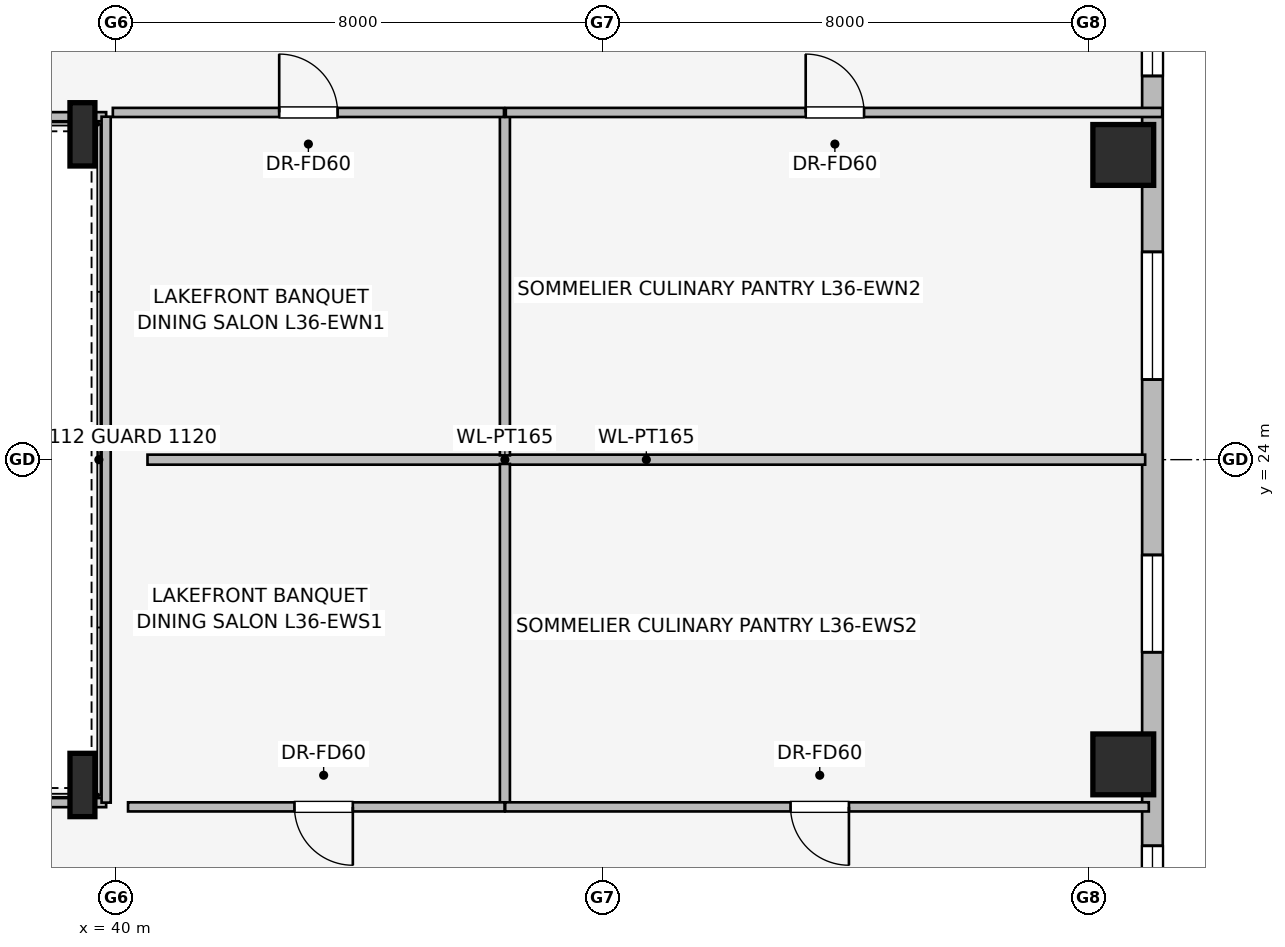
"""IFC4 building model, lengths in metres.
Left out: names, types, materials, properties, quantities, classifications, styles, units other than length and angle.
Written with IfcOpenShell. Run it as: python <this file> out.ifc"""

import sys

from ifc_helpers import new_model, si_unit, direction, frame, frame_2d, origin, origin_2d, place, context, subcontext, project, spatial, rectangle, i_section, extrude, element, fill, save


model = new_model("IFC4")
c1 = context("Model", 3, precision=1e-05, world=origin(), true_north=direction((0.0, 1.0)))
c2 = subcontext(c1, "Body", "Model", "MODEL_VIEW")
j1 = project(units=[si_unit("LENGTHUNIT", "METRE"), si_unit("PLANEANGLEUNIT", "RADIAN")], contexts=[c1])
p1 = place(None, origin())
s1 = spatial("IfcSite", under=j1, at=p1, CompositionType="ELEMENT")
p2 = place(p1, origin())
s2 = spatial("IfcBuilding", under=s1, at=p2, CompositionType="ELEMENT")
p3 = place(p2, frame((0.0, 0.0, 136.05)))
s3 = spatial("IfcBuildingStorey", under=s2, at=p3, CompositionType="ELEMENT", Elevation=136.05)
for number, where, z_axis, x_axis in (
    (1, (56.568, 18.989, 0.0), (0.0, 0.0, 1.0), (1.0, 0.0, 0.0)),
    (2, (56.568, 29.011, 0.0), (0.0, 0.0, 1.0), (1.0, 0.0, 0.0)),
):
    element("IfcColumn", number, at=place(p3, frame(where, z_axis=z_axis, x_axis=x_axis)), inside=s3, PredefinedType="COLUMN", context=c2, shape_type="SweptSolid", body=[
        extrude(rectangle(XDim=1.0, YDim=1.0, at=origin_2d()), origin(), (0.0, 0.0, 1.0), 3.45),
    ])
for number, where, z_axis, x_axis in (
    (3, (39.45, 18.65, 0.0), (0.0, 0.0, 1.0), (1.0, 0.0, 0.0)),
    (4, (39.45, 29.35, 0.0), (0.0, 0.0, 1.0), (1.0, 0.0, 0.0)),
):
    element("IfcColumn", number, at=place(p3, frame(where, z_axis=z_axis, x_axis=x_axis)), inside=s3, PredefinedType="COLUMN", context=c2, shape_type="SweptSolid", body=[
        extrude(i_section(OverallWidth=0.41, OverallDepth=1.041, WebThickness=0.031, FlangeThickness=0.056, at=origin_2d()), origin(), (0.0, 0.0, 1.0), 3.45),
    ])
p4 = place(p3, frame((57.048, 32.352, 0.0), z_axis=(0.0, 0.0, 1.0), x_axis=(0.0, -1.0, 0.0)))
e5 = element("IfcWall", 5, at=p4, inside=s3, PredefinedType="STANDARD", context=c2, shape_type="SweptSolid", body=[
    extrude(rectangle(XDim=16.704, YDim=0.34, at=frame_2d((8.352, 0.0))), origin(), (0.0, 0.0, 1.0), 3.16),
])
p5 = place(p4, frame((0.992, 0.0, 0.75)))
e6 = element("IfcOpeningElement", 6, at=p5, cuts=e5, PredefinedType="OPENING", context=c2, shape_type="SweptSolid", body=[
    extrude(rectangle(XDim=1.05, YDim=1.4, at=frame_2d((0.525, 0.7))), frame((0.0, 0.18, 0.0), z_axis=(0.0, -1.0, 0.0), x_axis=(1.0, 0.0, 0.0)), (0.0, 0.0, 1.0), 0.36),
])
p6 = place(p4, frame((4.935, 0.0, 0.75)))
e7 = element("IfcOpeningElement", 7, at=p6, cuts=e5, PredefinedType="OPENING", context=c2, shape_type="SweptSolid", body=[
    extrude(rectangle(XDim=2.1, YDim=1.5, at=frame_2d((1.05, 0.75))), frame((0.0, 0.18, 0.0), z_axis=(0.0, -1.0, 0.0), x_axis=(1.0, 0.0, 0.0)), (0.0, 0.0, 1.0), 0.36),
])
p7 = place(p4, frame((9.919, 0.0, 0.75)))
e8 = element("IfcOpeningElement", 8, at=p7, cuts=e5, PredefinedType="OPENING", context=c2, shape_type="SweptSolid", body=[
    extrude(rectangle(XDim=1.6, YDim=1.55, at=frame_2d((0.8, 0.775))), frame((0.0, 0.18, 0.0), z_axis=(0.0, -1.0, 0.0), x_axis=(1.0, 0.0, 0.0)), (0.0, 0.0, 1.0), 0.36),
])
p8 = place(p4, frame((14.702, 0.0, 0.75)))
e9 = element("IfcOpeningElement", 9, at=p8, cuts=e5, PredefinedType="OPENING", context=c2, shape_type="SweptSolid", body=[
    extrude(rectangle(XDim=1.05, YDim=1.4, at=frame_2d((0.525, 0.7))), frame((0.0, 0.18, 0.0), z_axis=(0.0, -1.0, 0.0), x_axis=(1.0, 0.0, 0.0)), (0.0, 0.0, 1.0), 0.36),
])
p9 = place(p3, frame((27.675, 18.36, 0.0), z_axis=(0.0, 0.0, 1.0), x_axis=(1.0, 0.0, 0.0)))
e10 = element("IfcWall", 10, at=p9, inside=s3, PredefinedType="PARTITIONING", context=c2, shape_type="SweptSolid", body=[
    extrude(rectangle(XDim=12.165, YDim=0.15, at=frame_2d((6.083, 0.0))), origin(), (0.0, 0.0, 1.0), 2.301),
])
p10 = place(p3, frame((39.84, 29.64, 0.0), z_axis=(0.0, 0.0, 1.0), x_axis=(-1.0, 0.0, 0.0)))
e11 = element("IfcWall", 11, at=p10, inside=s3, PredefinedType="PARTITIONING", context=c2, shape_type="SweptSolid", body=[
    extrude(rectangle(XDim=12.2, YDim=0.15, at=frame_2d((6.1, 0.0))), origin(), (0.0, 0.0, 1.0), 2.301),
])
p11 = place(p3, frame((39.84, 18.36, 0.0), z_axis=(0.0, 0.0, 1.0), x_axis=(0.0, 1.0, 0.0)))
e12 = element("IfcWall", 12, at=p11, inside=s3, PredefinedType="PARTITIONING", context=c2, shape_type="SweptSolid", body=[
    extrude(rectangle(XDim=11.28, YDim=0.15, at=frame_2d((5.64, 0.0))), origin(), (0.0, 0.0, 1.0), 3.16),
])
p12 = place(p3, frame((40.52, 24.0, 0.0), z_axis=(0.0, 0.0, 1.0), x_axis=(1.0, 0.0, 0.0)))
e13 = element("IfcWall", 13, at=p12, inside=s3, PredefinedType="PARTITIONING", context=c2, shape_type="SweptSolid", body=[
    extrude(rectangle(XDim=16.408, YDim=0.165, at=frame_2d((8.204, 0.0))), origin(), (0.0, 0.0, 1.0), 3.16),
])
p13 = place(p3, frame((46.398, 24.07, 0.0), z_axis=(0.0, 0.0, 1.0), x_axis=(0.0, 1.0, 0.0)))
e14 = element("IfcWall", 14, at=p13, inside=s3, PredefinedType="PARTITIONING", context=c2, shape_type="SweptSolid", body=[
    extrude(rectangle(XDim=5.64, YDim=0.165, at=frame_2d((2.82, 0.0))), origin(), (0.0, 0.0, 1.0), 2.703),
])
p14 = place(p3, frame((39.95, 29.71, 0.0), z_axis=(0.0, 0.0, 1.0), x_axis=(1.0, 0.0, 0.0)))
e15 = element("IfcWall", 15, at=p14, inside=s3, PredefinedType="PARTITIONING", context=c2, shape_type="SweptSolid", body=[
    extrude(rectangle(XDim=6.433, YDim=0.15, at=frame_2d((3.217, 0.0))), origin(), (0.0, 0.0, 1.0), 3.16),
])
p15 = place(p14, frame((2.736, 0.0, 0.0)))
e16 = element("IfcOpeningElement", 16, at=p15, cuts=e15, PredefinedType="OPENING", context=c2, shape_type="SweptSolid", body=[
    extrude(rectangle(XDim=0.96, YDim=2.0, at=frame_2d((0.48, 1.0))), frame((0.0, 0.085, 0.0), z_axis=(0.0, -1.0, 0.0), x_axis=(1.0, 0.0, 0.0)), (0.0, 0.0, 1.0), 0.17),
])
p16 = place(p3, frame((46.413, 29.71, 0.0), z_axis=(0.0, 0.0, 1.0), x_axis=(1.0, 0.0, 0.0)))
e17 = element("IfcWall", 17, at=p16, inside=s3, PredefinedType="PARTITIONING", context=c2, shape_type="SweptSolid", body=[
    extrude(rectangle(XDim=10.795, YDim=0.15, at=frame_2d((5.397, 0.0))), origin(), (0.0, 0.0, 1.0), 3.16),
])
p17 = place(p16, frame((4.932, 0.0, 0.0)))
e18 = element("IfcOpeningElement", 18, at=p17, cuts=e17, PredefinedType="OPENING", context=c2, shape_type="SweptSolid", body=[
    extrude(rectangle(XDim=0.96, YDim=2.0, at=frame_2d((0.48, 1.0))), frame((0.0, 0.085, 0.0), z_axis=(0.0, -1.0, 0.0), x_axis=(1.0, 0.0, 0.0)), (0.0, 0.0, 1.0), 0.17),
])
p18 = place(p3, frame((46.398, 18.29, 0.0), z_axis=(0.0, 0.0, 1.0), x_axis=(0.0, 1.0, 0.0)))
e19 = element("IfcWall", 19, at=p18, inside=s3, PredefinedType="PARTITIONING", context=c2, shape_type="SweptSolid", body=[
    extrude(rectangle(XDim=5.64, YDim=0.165, at=frame_2d((2.82, 0.0))), origin(), (0.0, 0.0, 1.0), 2.703),
])
p19 = place(p3, frame((46.393, 18.29, 0.0), z_axis=(0.0, 0.0, 1.0), x_axis=(-1.0, 0.0, 0.0)))
e20 = element("IfcWall", 20, at=p19, inside=s3, PredefinedType="PARTITIONING", context=c2, shape_type="SweptSolid", body=[
    extrude(rectangle(XDim=6.193, YDim=0.15, at=frame_2d((3.097, 0.0))), origin(), (0.0, 0.0, 1.0), 3.16),
])
p20 = place(p19, frame((2.496, 0.0, 0.0)))
e21 = element("IfcOpeningElement", 21, at=p20, cuts=e20, PredefinedType="OPENING", context=c2, shape_type="SweptSolid", body=[
    extrude(rectangle(XDim=0.96, YDim=2.0, at=frame_2d((0.48, 1.0))), frame((0.0, 0.085, 0.0), z_axis=(0.0, -1.0, 0.0), x_axis=(1.0, 0.0, 0.0)), (0.0, 0.0, 1.0), 0.17),
])
p21 = place(p3, frame((56.988, 18.29, 0.0), z_axis=(0.0, 0.0, 1.0), x_axis=(-1.0, 0.0, 0.0)))
e22 = element("IfcWall", 22, at=p21, inside=s3, PredefinedType="PARTITIONING", context=c2, shape_type="SweptSolid", body=[
    extrude(rectangle(XDim=10.585, YDim=0.15, at=frame_2d((5.292, 0.0))), origin(), (0.0, 0.0, 1.0), 3.16),
])
p22 = place(p21, frame((4.932, 0.0, 0.0)))
e23 = element("IfcOpeningElement", 23, at=p22, cuts=e22, PredefinedType="OPENING", context=c2, shape_type="SweptSolid", body=[
    extrude(rectangle(XDim=0.96, YDim=2.0, at=frame_2d((0.48, 1.0))), frame((0.0, 0.085, 0.0), z_axis=(0.0, -1.0, 0.0), x_axis=(1.0, 0.0, 0.0)), (0.0, 0.0, 1.0), 0.17),
])
p23 = place(p5, origin())
e24 = element("IfcWindow", 24, at=p23, inside=s3, PartitioningType="SINGLE_PANEL", PredefinedType="WINDOW", context=c2, shape_type="SweptSolid", body=[
    extrude(rectangle(XDim=1.05, YDim=1.4, at=frame_2d((0.525, 0.7))), frame((0.0, 0.03, 0.0), z_axis=(0.0, -1.0, 0.0), x_axis=(1.0, 0.0, 0.0)), (0.0, 0.0, 1.0), 0.06),
])
fill(e6, e24)
p24 = place(p6, origin())
e25 = element("IfcWindow", 25, at=p24, inside=s3, PartitioningType="SINGLE_PANEL", PredefinedType="WINDOW", context=c2, shape_type="SweptSolid", body=[
    extrude(rectangle(XDim=2.1, YDim=1.5, at=frame_2d((1.05, 0.75))), frame((0.0, 0.03, 0.0), z_axis=(0.0, -1.0, 0.0), x_axis=(1.0, 0.0, 0.0)), (0.0, 0.0, 1.0), 0.06),
])
fill(e7, e25)
p25 = place(p7, origin())
e26 = element("IfcWindow", 26, at=p25, inside=s3, PartitioningType="SINGLE_PANEL", PredefinedType="WINDOW", context=c2, shape_type="SweptSolid", body=[
    extrude(rectangle(XDim=1.6, YDim=1.55, at=frame_2d((0.8, 0.775))), frame((0.0, 0.03, 0.0), z_axis=(0.0, -1.0, 0.0), x_axis=(1.0, 0.0, 0.0)), (0.0, 0.0, 1.0), 0.06),
])
fill(e8, e26)
p26 = place(p8, origin())
e27 = element("IfcWindow", 27, at=p26, inside=s3, PartitioningType="SINGLE_PANEL", PredefinedType="WINDOW", context=c2, shape_type="SweptSolid", body=[
    extrude(rectangle(XDim=1.05, YDim=1.4, at=frame_2d((0.525, 0.7))), frame((0.0, 0.03, 0.0), z_axis=(0.0, -1.0, 0.0), x_axis=(1.0, 0.0, 0.0)), (0.0, 0.0, 1.0), 0.06),
])
fill(e9, e27)
p27 = place(p15, origin())
e28 = element("IfcDoor", 28, at=p27, inside=s3, OperationType="SINGLE_SWING_LEFT", PredefinedType="DOOR", context=c2, shape_type="SweptSolid", body=[
    extrude(rectangle(XDim=0.96, YDim=2.0, at=frame_2d((0.48, 1.0))), frame((0.0, 0.025, 0.0), z_axis=(0.0, -1.0, 0.0), x_axis=(1.0, 0.0, 0.0)), (0.0, 0.0, 1.0), 0.05),
])
fill(e16, e28)
p28 = place(p17, origin())
e29 = element("IfcDoor", 29, at=p28, inside=s3, OperationType="SINGLE_SWING_LEFT", PredefinedType="DOOR", context=c2, shape_type="SweptSolid", body=[
    extrude(rectangle(XDim=0.96, YDim=2.0, at=frame_2d((0.48, 1.0))), frame((0.0, 0.025, 0.0), z_axis=(0.0, -1.0, 0.0), x_axis=(1.0, 0.0, 0.0)), (0.0, 0.0, 1.0), 0.05),
])
fill(e18, e29)
p29 = place(p20, origin())
e30 = element("IfcDoor", 30, at=p29, inside=s3, OperationType="SINGLE_SWING_LEFT", PredefinedType="DOOR", context=c2, shape_type="SweptSolid", body=[
    extrude(rectangle(XDim=0.96, YDim=2.0, at=frame_2d((0.48, 1.0))), frame((0.0, 0.025, 0.0), z_axis=(0.0, -1.0, 0.0), x_axis=(1.0, 0.0, 0.0)), (0.0, 0.0, 1.0), 0.05),
])
fill(e21, e30)
p30 = place(p22, origin())
e31 = element("IfcDoor", 31, at=p30, inside=s3, OperationType="SINGLE_SWING_LEFT", PredefinedType="DOOR", context=c2, shape_type="SweptSolid", body=[
    extrude(rectangle(XDim=0.96, YDim=2.0, at=frame_2d((0.48, 1.0))), frame((0.0, 0.025, 0.0), z_axis=(0.0, -1.0, 0.0), x_axis=(1.0, 0.0, 0.0)), (0.0, 0.0, 1.0), 0.05),
])
fill(e23, e31)
save(model, sys.argv[1])
